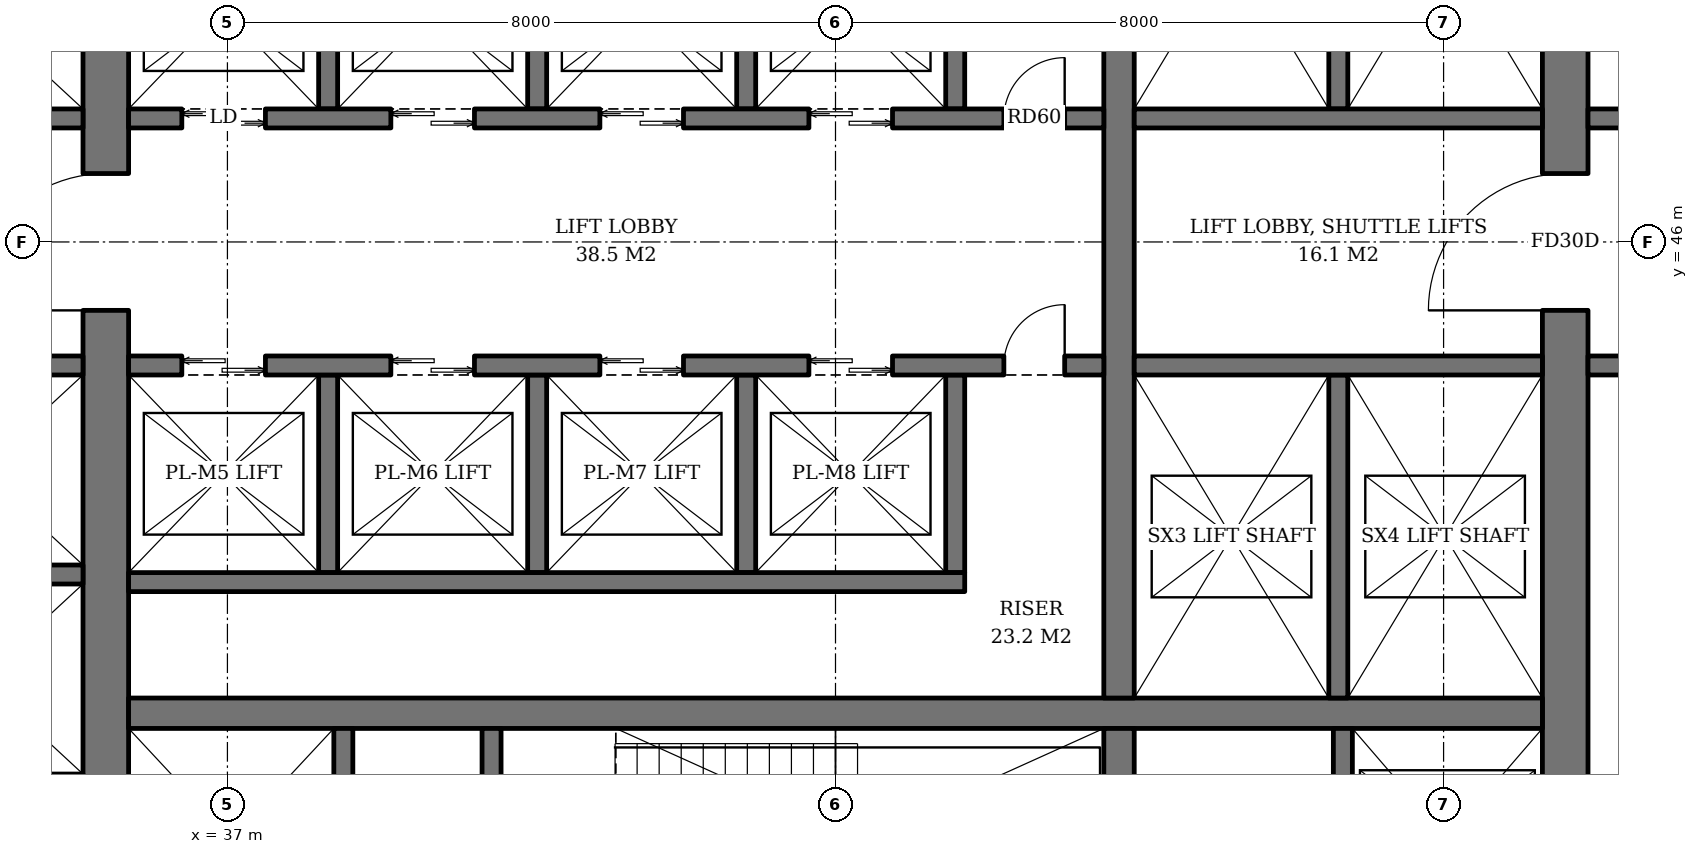
"""IFC4 building model, lengths in metres.
Left out: names, types, materials, properties, quantities, classifications, styles, units other than length and angle.
Written with IfcOpenShell. Run it as: python <this file> out.ifc"""

import sys

from ifc_helpers import new_model, si_unit, direction, frame, frame_2d, origin, place, context, subcontext, project, spatial, rectangle, extrude, element, fill, save


model = new_model("IFC4")
c1 = context("Model", 3, precision=1e-05, world=origin(), true_north=direction((0.0, 1.0)))
c2 = subcontext(c1, "Body", "Model", "MODEL_VIEW")
j1 = project(units=[si_unit("LENGTHUNIT", "METRE"), si_unit("PLANEANGLEUNIT", "RADIAN")], contexts=[c1])
p1 = place(None, origin())
s1 = spatial("IfcSite", under=j1, at=p1, CompositionType="ELEMENT")
p2 = place(p1, origin())
s2 = spatial("IfcBuilding", under=s1, at=p2, CompositionType="ELEMENT")
p3 = place(p2, frame((0.0, 0.0, 97.0)))
s3 = spatial("IfcBuildingStorey", under=s2, at=p3, CompositionType="ELEMENT", Elevation=97.0)
p4 = place(p3, frame((35.4, 36.7, 0.0), z_axis=(0.0, 0.0, 1.0), x_axis=(0.0, 1.0, 0.0)))
e1 = element("IfcWall", 1, at=p4, inside=s3, PredefinedType="SHEAR", context=c2, shape_type="SweptSolid", body=[
    extrude(rectangle(XDim=18.6, YDim=0.6, at=frame_2d((9.3, 0.0))), origin(), (0.0, 0.0, 1.0), 3.8),
])
p5 = place(p4, frame((8.4, 0.0, 0.0)))
e2 = element("IfcOpeningElement", 2, at=p5, cuts=e1, PredefinedType="OPENING", context=c2, shape_type="SweptSolid", body=[
    extrude(rectangle(XDim=1.8, YDim=2.4, at=frame_2d((0.9, 1.2))), frame((0.0, 0.31, 0.0), z_axis=(0.0, -1.0, 0.0), x_axis=(1.0, 0.0, 0.0)), (0.0, 0.0, 1.0), 0.62),
])
p6 = place(p3, frame((54.6, 36.7, 0.0), z_axis=(0.0, 0.0, 1.0), x_axis=(0.0, 1.0, 0.0)))
e3 = element("IfcWall", 3, at=p6, inside=s3, PredefinedType="SHEAR", context=c2, shape_type="SweptSolid", body=[
    extrude(rectangle(XDim=18.6, YDim=0.6, at=frame_2d((9.3, 0.0))), origin(), (0.0, 0.0, 1.0), 3.8),
])
p7 = place(p6, frame((8.4, 0.0, 0.0)))
e4 = element("IfcOpeningElement", 4, at=p7, cuts=e3, PredefinedType="OPENING", context=c2, shape_type="SweptSolid", body=[
    extrude(rectangle(XDim=1.8, YDim=2.4, at=frame_2d((0.9, 1.2))), frame((0.0, 0.31, 0.0), z_axis=(0.0, -1.0, 0.0), x_axis=(1.0, 0.0, 0.0)), (0.0, 0.0, 1.0), 0.62),
])
p8 = place(p3, frame((35.7, 39.8, 0.0), z_axis=(0.0, 0.0, 1.0), x_axis=(1.0, 0.0, 0.0)))
e5 = element("IfcWall", 5, at=p8, inside=s3, PredefinedType="SHEAR", context=c2, shape_type="SweptSolid", body=[
    extrude(rectangle(XDim=18.6, YDim=0.4, at=frame_2d((9.3, 0.0))), origin(), (0.0, 0.0, 1.0), 3.8),
])
p9 = place(p3, frame((48.73, 36.7, 0.0), z_axis=(0.0, 0.0, 1.0), x_axis=(0.0, 1.0, 0.0)))
e6 = element("IfcWall", 6, at=p9, inside=s3, PredefinedType="SHEAR", context=c2, shape_type="SweptSolid", body=[
    extrude(rectangle(XDim=2.9, YDim=0.4, at=frame_2d((1.45, 0.0))), origin(), (0.0, 0.0, 1.0), 3.8),
])
p10 = place(p3, frame((48.73, 40.0, 0.0), z_axis=(0.0, 0.0, 1.0), x_axis=(0.0, 1.0, 0.0)))
e7 = element("IfcWall", 7, at=p10, inside=s3, PredefinedType="SHEAR", context=c2, shape_type="SweptSolid", body=[
    extrude(rectangle(XDim=12.0, YDim=0.4, at=frame_2d((6.0, 0.0))), origin(), (0.0, 0.0, 1.0), 3.8),
])
p11 = place(p3, frame((38.525, 36.7, 0.0), z_axis=(0.0, 0.0, 1.0), x_axis=(0.0, 1.0, 0.0)))
e8 = element("IfcWall", 8, at=p11, inside=s3, PredefinedType="SHEAR", context=c2, shape_type="SweptSolid", body=[
    extrude(rectangle(XDim=2.9, YDim=0.25, at=frame_2d((1.45, 0.0))), origin(), (0.0, 0.0, 1.0), 3.8),
])
p12 = place(p11, frame((0.8, 0.0, 0.0)))
e9 = element("IfcOpeningElement", 9, at=p12, cuts=e8, PredefinedType="OPENING", context=c2, shape_type="SweptSolid", body=[
    extrude(rectangle(XDim=1.3, YDim=2.2, at=frame_2d((0.65, 1.1))), frame((0.0, 0.135, 0.0), z_axis=(0.0, -1.0, 0.0), x_axis=(1.0, 0.0, 0.0)), (0.0, 0.0, 1.0), 0.27),
])
p13 = place(p3, frame((40.475, 36.7, 0.0), z_axis=(0.0, 0.0, 1.0), x_axis=(0.0, 1.0, 0.0)))
e10 = element("IfcWall", 10, at=p13, inside=s3, PredefinedType="SHEAR", context=c2, shape_type="SweptSolid", body=[
    extrude(rectangle(XDim=2.9, YDim=0.25, at=frame_2d((1.45, 0.0))), origin(), (0.0, 0.0, 1.0), 3.8),
])
p14 = place(p13, frame((0.75, 0.0, 0.0)))
e11 = element("IfcOpeningElement", 11, at=p14, cuts=e10, PredefinedType="OPENING", context=c2, shape_type="SweptSolid", body=[
    extrude(rectangle(XDim=1.2, YDim=2.1, at=frame_2d((0.6, 1.05))), frame((0.0, 0.135, 0.0), z_axis=(0.0, -1.0, 0.0), x_axis=(1.0, 0.0, 0.0)), (0.0, 0.0, 1.0), 0.27),
])
p15 = place(p3, frame((51.675, 36.7, 0.0), z_axis=(0.0, 0.0, 1.0), x_axis=(0.0, 1.0, 0.0)))
e12 = element("IfcWall", 12, at=p15, inside=s3, PredefinedType="SHEAR", context=c2, shape_type="SweptSolid", body=[
    extrude(rectangle(XDim=2.9, YDim=0.25, at=frame_2d((1.45, 0.0))), origin(), (0.0, 0.0, 1.0), 3.8),
])
p16 = place(p15, frame((0.75, 0.0, 0.0)))
e13 = element("IfcOpeningElement", 13, at=p16, cuts=e12, PredefinedType="OPENING", context=c2, shape_type="SweptSolid", body=[
    extrude(rectangle(XDim=1.4, YDim=2.4, at=frame_2d((0.7, 1.2))), frame((0.0, 0.135, 0.0), z_axis=(0.0, -1.0, 0.0), x_axis=(1.0, 0.0, 0.0)), (0.0, 0.0, 1.0), 0.27),
])
for number, where, z_axis, x_axis in (
    (14, (38.325, 47.75, 0.0), (0.0, 0.0, 1.0), (0.0, 1.0, 0.0)),
    (15, (41.075, 47.75, 0.0), (0.0, 0.0, 1.0), (0.0, 1.0, 0.0)),
    (16, (43.825, 47.75, 0.0), (0.0, 0.0, 1.0), (0.0, 1.0, 0.0)),
    (17, (46.575, 47.75, 0.0), (0.0, 0.0, 1.0), (0.0, 1.0, 0.0)),
):
    element("IfcWall", number, at=place(p3, frame(where, z_axis=z_axis, x_axis=x_axis)), inside=s3, PredefinedType="SHEAR", context=c2, shape_type="SweptSolid", body=[
        extrude(rectangle(XDim=2.6, YDim=0.25, at=frame_2d((1.3, 0.0))), origin(), (0.0, 0.0, 1.0), 3.8),
    ])
p17 = place(p3, frame((35.7, 47.625, 0.0), z_axis=(0.0, 0.0, 1.0), x_axis=(1.0, 0.0, 0.0)))
e18 = element("IfcWall", 18, at=p17, inside=s3, PredefinedType="SHEAR", context=c2, shape_type="SweptSolid", body=[
    extrude(rectangle(XDim=12.83, YDim=0.25, at=frame_2d((6.415, 0.0))), origin(), (0.0, 0.0, 1.0), 3.8),
])
p18 = place(p17, frame((0.7, 0.0, 0.0)))
e19 = element("IfcOpeningElement", 19, at=p18, cuts=e18, PredefinedType="OPENING", context=c2, shape_type="SweptSolid", body=[
    extrude(rectangle(XDim=1.1, YDim=2.2, at=frame_2d((0.55, 1.1))), frame((0.0, 0.135, 0.0), z_axis=(0.0, -1.0, 0.0), x_axis=(1.0, 0.0, 0.0)), (0.0, 0.0, 1.0), 0.27),
])
p19 = place(p17, frame((3.45, 0.0, 0.0)))
e20 = element("IfcOpeningElement", 20, at=p19, cuts=e18, PredefinedType="OPENING", context=c2, shape_type="SweptSolid", body=[
    extrude(rectangle(XDim=1.1, YDim=2.2, at=frame_2d((0.55, 1.1))), frame((0.0, 0.135, 0.0), z_axis=(0.0, -1.0, 0.0), x_axis=(1.0, 0.0, 0.0)), (0.0, 0.0, 1.0), 0.27),
])
p20 = place(p17, frame((6.2, 0.0, 0.0)))
e21 = element("IfcOpeningElement", 21, at=p20, cuts=e18, PredefinedType="OPENING", context=c2, shape_type="SweptSolid", body=[
    extrude(rectangle(XDim=1.1, YDim=2.2, at=frame_2d((0.55, 1.1))), frame((0.0, 0.135, 0.0), z_axis=(0.0, -1.0, 0.0), x_axis=(1.0, 0.0, 0.0)), (0.0, 0.0, 1.0), 0.27),
])
p21 = place(p17, frame((8.95, 0.0, 0.0)))
e22 = element("IfcOpeningElement", 22, at=p21, cuts=e18, PredefinedType="OPENING", context=c2, shape_type="SweptSolid", body=[
    extrude(rectangle(XDim=1.1, YDim=2.2, at=frame_2d((0.55, 1.1))), frame((0.0, 0.135, 0.0), z_axis=(0.0, -1.0, 0.0), x_axis=(1.0, 0.0, 0.0)), (0.0, 0.0, 1.0), 0.27),
])
p22 = place(p17, frame((11.515, 0.0, 0.0)))
e23 = element("IfcOpeningElement", 23, at=p22, cuts=e18, PredefinedType="OPENING", context=c2, shape_type="SweptSolid", body=[
    extrude(rectangle(XDim=0.8, YDim=2.0, at=frame_2d((0.4, 1.0))), frame((0.0, 0.135, 0.0), z_axis=(0.0, -1.0, 0.0), x_axis=(1.0, 0.0, 0.0)), (0.0, 0.0, 1.0), 0.27),
])
for number, where, z_axis, x_axis in (
    (24, (38.325, 44.25, 0.0), (0.0, 0.0, 1.0), (0.0, -1.0, 0.0)),
    (25, (41.075, 44.25, 0.0), (0.0, 0.0, 1.0), (0.0, -1.0, 0.0)),
    (26, (43.825, 44.25, 0.0), (0.0, 0.0, 1.0), (0.0, -1.0, 0.0)),
    (27, (46.575, 44.25, 0.0), (0.0, 0.0, 1.0), (0.0, -1.0, 0.0)),
):
    element("IfcWall", number, at=place(p3, frame(where, z_axis=z_axis, x_axis=x_axis)), inside=s3, PredefinedType="SHEAR", context=c2, shape_type="SweptSolid", body=[
        extrude(rectangle(XDim=2.6, YDim=0.25, at=frame_2d((1.3, 0.0))), origin(), (0.0, 0.0, 1.0), 3.8),
    ])
p23 = place(p3, frame((35.7, 41.525, 0.0), z_axis=(0.0, 0.0, 1.0), x_axis=(1.0, 0.0, 0.0)))
e28 = element("IfcWall", 28, at=p23, inside=s3, PredefinedType="SHEAR", context=c2, shape_type="SweptSolid", body=[
    extrude(rectangle(XDim=11.0, YDim=0.25, at=frame_2d((5.5, 0.0))), origin(), (0.0, 0.0, 1.0), 3.8),
])
p24 = place(p3, frame((35.7, 44.375, 0.0), z_axis=(0.0, 0.0, 1.0), x_axis=(1.0, 0.0, 0.0)))
e29 = element("IfcWall", 29, at=p24, inside=s3, PredefinedType="SHEAR", context=c2, shape_type="SweptSolid", body=[
    extrude(rectangle(XDim=12.83, YDim=0.25, at=frame_2d((6.415, 0.0))), origin(), (0.0, 0.0, 1.0), 3.8),
])
p25 = place(p24, frame((0.7, 0.0, 0.0)))
e30 = element("IfcOpeningElement", 30, at=p25, cuts=e29, PredefinedType="OPENING", context=c2, shape_type="SweptSolid", body=[
    extrude(rectangle(XDim=1.1, YDim=2.2, at=frame_2d((0.55, 1.1))), frame((0.0, 0.135, 0.0), z_axis=(0.0, -1.0, 0.0), x_axis=(1.0, 0.0, 0.0)), (0.0, 0.0, 1.0), 0.27),
])
p26 = place(p24, frame((3.45, 0.0, 0.0)))
e31 = element("IfcOpeningElement", 31, at=p26, cuts=e29, PredefinedType="OPENING", context=c2, shape_type="SweptSolid", body=[
    extrude(rectangle(XDim=1.1, YDim=2.2, at=frame_2d((0.55, 1.1))), frame((0.0, 0.135, 0.0), z_axis=(0.0, -1.0, 0.0), x_axis=(1.0, 0.0, 0.0)), (0.0, 0.0, 1.0), 0.27),
])
p27 = place(p24, frame((6.2, 0.0, 0.0)))
e32 = element("IfcOpeningElement", 32, at=p27, cuts=e29, PredefinedType="OPENING", context=c2, shape_type="SweptSolid", body=[
    extrude(rectangle(XDim=1.1, YDim=2.2, at=frame_2d((0.55, 1.1))), frame((0.0, 0.135, 0.0), z_axis=(0.0, -1.0, 0.0), x_axis=(1.0, 0.0, 0.0)), (0.0, 0.0, 1.0), 0.27),
])
p28 = place(p24, frame((8.95, 0.0, 0.0)))
e33 = element("IfcOpeningElement", 33, at=p28, cuts=e29, PredefinedType="OPENING", context=c2, shape_type="SweptSolid", body=[
    extrude(rectangle(XDim=1.1, YDim=2.2, at=frame_2d((0.55, 1.1))), frame((0.0, 0.135, 0.0), z_axis=(0.0, -1.0, 0.0), x_axis=(1.0, 0.0, 0.0)), (0.0, 0.0, 1.0), 0.27),
])
p29 = place(p24, frame((11.515, 0.0, 0.0)))
e34 = element("IfcOpeningElement", 34, at=p29, cuts=e29, PredefinedType="OPENING", context=c2, shape_type="SweptSolid", body=[
    extrude(rectangle(XDim=0.8, YDim=2.0, at=frame_2d((0.4, 1.0))), frame((0.0, 0.135, 0.0), z_axis=(0.0, -1.0, 0.0), x_axis=(1.0, 0.0, 0.0)), (0.0, 0.0, 1.0), 0.27),
])
p30 = place(p3, frame((51.615, 47.75, 0.0), z_axis=(0.0, 0.0, 1.0), x_axis=(0.0, 1.0, 0.0)))
e35 = element("IfcWall", 35, at=p30, inside=s3, PredefinedType="SHEAR", context=c2, shape_type="SweptSolid", body=[
    extrude(rectangle(XDim=4.25, YDim=0.25, at=frame_2d((2.125, 0.0))), origin(), (0.0, 0.0, 1.0), 3.8),
])
p31 = place(p3, frame((48.93, 47.625, 0.0), z_axis=(0.0, 0.0, 1.0), x_axis=(1.0, 0.0, 0.0)))
e36 = element("IfcWall", 36, at=p31, inside=s3, PredefinedType="SHEAR", context=c2, shape_type="SweptSolid", body=[
    extrude(rectangle(XDim=5.37, YDim=0.25, at=frame_2d((2.685, 0.0))), origin(), (0.0, 0.0, 1.0), 3.8),
])
p32 = place(p3, frame((51.615, 44.25, 0.0), z_axis=(0.0, 0.0, 1.0), x_axis=(0.0, -1.0, 0.0)))
e37 = element("IfcWall", 37, at=p32, inside=s3, PredefinedType="SHEAR", context=c2, shape_type="SweptSolid", body=[
    extrude(rectangle(XDim=4.25, YDim=0.25, at=frame_2d((2.125, 0.0))), origin(), (0.0, 0.0, 1.0), 3.8),
])
p33 = place(p3, frame((48.93, 44.375, 0.0), z_axis=(0.0, 0.0, 1.0), x_axis=(1.0, 0.0, 0.0)))
e38 = element("IfcWall", 38, at=p33, inside=s3, PredefinedType="SHEAR", context=c2, shape_type="SweptSolid", body=[
    extrude(rectangle(XDim=5.37, YDim=0.25, at=frame_2d((2.685, 0.0))), origin(), (0.0, 0.0, 1.0), 3.8),
])
for number, where, z_axis, x_axis in (
    (39, (32.4, 41.625, 0.0), (0.0, 0.0, 1.0), (1.0, 0.0, 0.0)),
    (40, (32.4, 44.375, 0.0), (0.0, 0.0, 1.0), (1.0, 0.0, 0.0)),
    (41, (32.4, 47.625, 0.0), (0.0, 0.0, 1.0), (1.0, 0.0, 0.0)),
):
    element("IfcWall", number, at=place(p3, frame(where, z_axis=z_axis, x_axis=x_axis)), inside=s3, PredefinedType="SHEAR", context=c2, shape_type="SweptSolid", body=[
        extrude(rectangle(XDim=2.7, YDim=0.25, at=frame_2d((1.35, 0.0))), origin(), (0.0, 0.0, 1.0), 3.8),
    ])
for number, where, z_axis, x_axis in (
    (42, (54.9, 44.375, 0.0), (0.0, 0.0, 1.0), (1.0, 0.0, 0.0)),
    (43, (54.9, 47.625, 0.0), (0.0, 0.0, 1.0), (1.0, 0.0, 0.0)),
):
    element("IfcWall", number, at=place(p3, frame(where, z_axis=z_axis, x_axis=x_axis)), inside=s3, PredefinedType="SOLIDWALL", context=c2, shape_type="SweptSolid", body=[
        extrude(rectangle(XDim=2.7, YDim=0.25, at=frame_2d((1.35, 0.0))), origin(), (0.0, 0.0, 1.0), 3.62),
    ])
p34 = place(p18, origin())
e44 = element("IfcDoor", 44, at=p34, inside=s3, OperationType="DOUBLE_DOOR_SLIDING", PredefinedType="DOOR", context=c2, shape_type="SweptSolid", body=[
    extrude(rectangle(XDim=1.1, YDim=2.2, at=frame_2d((0.55, 1.1))), frame((0.0, 0.025, 0.0), z_axis=(0.0, -1.0, 0.0), x_axis=(1.0, 0.0, 0.0)), (0.0, 0.0, 1.0), 0.05),
])
fill(e19, e44)
p35 = place(p19, origin())
e45 = element("IfcDoor", 45, at=p35, inside=s3, OperationType="DOUBLE_DOOR_SLIDING", PredefinedType="DOOR", context=c2, shape_type="SweptSolid", body=[
    extrude(rectangle(XDim=1.1, YDim=2.2, at=frame_2d((0.55, 1.1))), frame((0.0, 0.025, 0.0), z_axis=(0.0, -1.0, 0.0), x_axis=(1.0, 0.0, 0.0)), (0.0, 0.0, 1.0), 0.05),
])
fill(e20, e45)
p36 = place(p20, origin())
e46 = element("IfcDoor", 46, at=p36, inside=s3, OperationType="DOUBLE_DOOR_SLIDING", PredefinedType="DOOR", context=c2, shape_type="SweptSolid", body=[
    extrude(rectangle(XDim=1.1, YDim=2.2, at=frame_2d((0.55, 1.1))), frame((0.0, 0.025, 0.0), z_axis=(0.0, -1.0, 0.0), x_axis=(1.0, 0.0, 0.0)), (0.0, 0.0, 1.0), 0.05),
])
fill(e21, e46)
p37 = place(p21, origin())
e47 = element("IfcDoor", 47, at=p37, inside=s3, OperationType="DOUBLE_DOOR_SLIDING", PredefinedType="DOOR", context=c2, shape_type="SweptSolid", body=[
    extrude(rectangle(XDim=1.1, YDim=2.2, at=frame_2d((0.55, 1.1))), frame((0.0, 0.025, 0.0), z_axis=(0.0, -1.0, 0.0), x_axis=(1.0, 0.0, 0.0)), (0.0, 0.0, 1.0), 0.05),
])
fill(e22, e47)
p38 = place(p22, origin())
e48 = element("IfcDoor", 48, at=p38, inside=s3, OperationType="SINGLE_SWING_RIGHT", PredefinedType="DOOR", context=c2, shape_type="SweptSolid", body=[
    extrude(rectangle(XDim=0.8, YDim=2.0, at=frame_2d((0.4, 1.0))), frame((0.0, 0.025, 0.0), z_axis=(0.0, -1.0, 0.0), x_axis=(1.0, 0.0, 0.0)), (0.0, 0.0, 1.0), 0.05),
])
fill(e23, e48)
p39 = place(p25, origin())
e49 = element("IfcDoor", 49, at=p39, inside=s3, OperationType="DOUBLE_DOOR_SLIDING", PredefinedType="DOOR", context=c2, shape_type="SweptSolid", body=[
    extrude(rectangle(XDim=1.1, YDim=2.2, at=frame_2d((0.55, 1.1))), frame((0.0, 0.025, 0.0), z_axis=(0.0, -1.0, 0.0), x_axis=(1.0, 0.0, 0.0)), (0.0, 0.0, 1.0), 0.05),
])
fill(e30, e49)
p40 = place(p26, origin())
e50 = element("IfcDoor", 50, at=p40, inside=s3, OperationType="DOUBLE_DOOR_SLIDING", PredefinedType="DOOR", context=c2, shape_type="SweptSolid", body=[
    extrude(rectangle(XDim=1.1, YDim=2.2, at=frame_2d((0.55, 1.1))), frame((0.0, 0.025, 0.0), z_axis=(0.0, -1.0, 0.0), x_axis=(1.0, 0.0, 0.0)), (0.0, 0.0, 1.0), 0.05),
])
fill(e31, e50)
p41 = place(p27, origin())
e51 = element("IfcDoor", 51, at=p41, inside=s3, OperationType="DOUBLE_DOOR_SLIDING", PredefinedType="DOOR", context=c2, shape_type="SweptSolid", body=[
    extrude(rectangle(XDim=1.1, YDim=2.2, at=frame_2d((0.55, 1.1))), frame((0.0, 0.025, 0.0), z_axis=(0.0, -1.0, 0.0), x_axis=(1.0, 0.0, 0.0)), (0.0, 0.0, 1.0), 0.05),
])
fill(e32, e51)
p42 = place(p28, origin())
e52 = element("IfcDoor", 52, at=p42, inside=s3, OperationType="DOUBLE_DOOR_SLIDING", PredefinedType="DOOR", context=c2, shape_type="SweptSolid", body=[
    extrude(rectangle(XDim=1.1, YDim=2.2, at=frame_2d((0.55, 1.1))), frame((0.0, 0.025, 0.0), z_axis=(0.0, -1.0, 0.0), x_axis=(1.0, 0.0, 0.0)), (0.0, 0.0, 1.0), 0.05),
])
fill(e33, e52)
p43 = place(p29, origin())
e53 = element("IfcDoor", 53, at=p43, inside=s3, OperationType="SINGLE_SWING_RIGHT", PredefinedType="DOOR", context=c2, shape_type="SweptSolid", body=[
    extrude(rectangle(XDim=0.8, YDim=2.0, at=frame_2d((0.4, 1.0))), frame((0.0, 0.025, 0.0), z_axis=(0.0, -1.0, 0.0), x_axis=(1.0, 0.0, 0.0)), (0.0, 0.0, 1.0), 0.05),
])
fill(e34, e53)
p44 = place(p5, origin())
e54 = element("IfcDoor", 54, at=p44, inside=s3, OperationType="DOUBLE_DOOR_SINGLE_SWING", PredefinedType="DOOR", context=c2, shape_type="SweptSolid", body=[
    extrude(rectangle(XDim=1.8, YDim=2.4, at=frame_2d((0.9, 1.2))), frame((0.0, 0.025, 0.0), z_axis=(0.0, -1.0, 0.0), x_axis=(1.0, 0.0, 0.0)), (0.0, 0.0, 1.0), 0.05),
])
fill(e2, e54)
p45 = place(p7, origin())
e55 = element("IfcDoor", 55, at=p45, inside=s3, OperationType="DOUBLE_DOOR_SINGLE_SWING", PredefinedType="DOOR", context=c2, shape_type="SweptSolid", body=[
    extrude(rectangle(XDim=1.8, YDim=2.4, at=frame_2d((0.9, 1.2))), frame((0.0, 0.025, 0.0), z_axis=(0.0, -1.0, 0.0), x_axis=(1.0, 0.0, 0.0)), (0.0, 0.0, 1.0), 0.05),
])
fill(e4, e55)
save(model, sys.argv[1])
